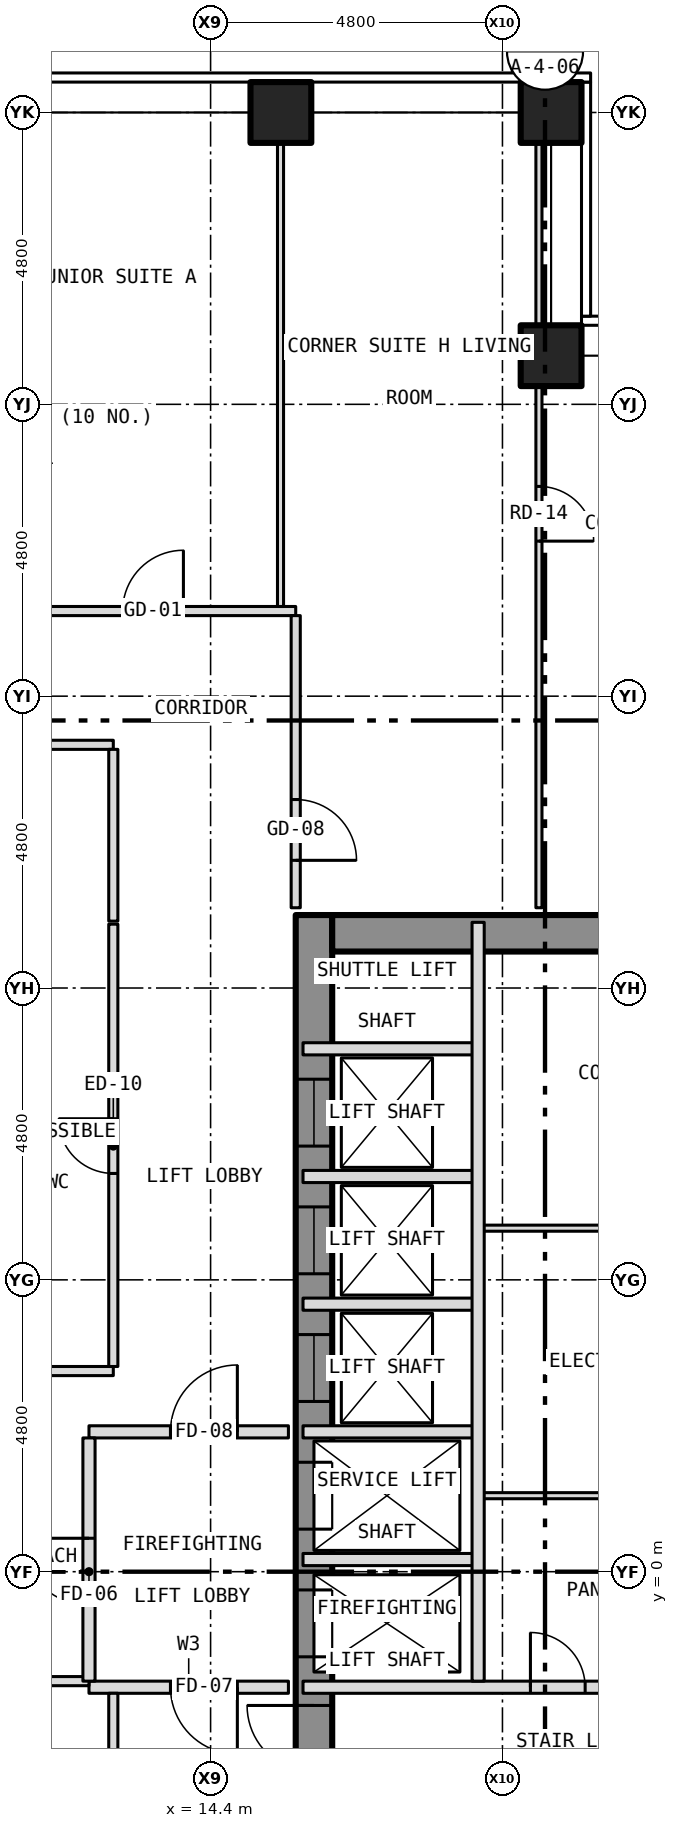
"""IFC4 building model, lengths in metres.
Left out: names, types, materials, properties, quantities, classifications, styles, units other than length and angle.
Written with IfcOpenShell. Run it as: python <this file> out.ifc"""

import sys

from ifc_helpers import new_model, si_unit, direction, frame, frame_2d, origin, origin_2d, place, context, subcontext, project, spatial, rectangle, hollow_rectangle, extrude, element, fill, save


model = new_model("IFC4")
c1 = context("Model", 3, precision=1e-05, world=origin(), true_north=direction((0.0, 1.0)))
c2 = subcontext(c1, "Body", "Model", "MODEL_VIEW")
j1 = project(units=[si_unit("LENGTHUNIT", "METRE"), si_unit("PLANEANGLEUNIT", "RADIAN")], contexts=[c1])
p1 = place(None, origin())
s1 = spatial("IfcSite", under=j1, at=p1, CompositionType="ELEMENT")
p2 = place(p1, origin())
s2 = spatial("IfcBuilding", under=s1, at=p2, CompositionType="ELEMENT")
p3 = place(p2, frame((0.0, 0.0, 67.0)))
s3 = spatial("IfcBuildingStorey", under=s2, at=p3, CompositionType="ELEMENT", Elevation=67.0)
for number, where, z_axis, x_axis in (
    (1, (15.556, 24.0, -0.15), (0.0, 0.0, 1.0), (1.0, 0.0, 0.0)),
    (2, (20.0, 24.0, -0.15), (0.0, 0.0, 1.0), (1.0, 0.0, 0.0)),
    (3, (20.0, 20.0, -0.15), (0.0, 0.0, 1.0), (1.0, 0.0, 0.0)),
):
    element("IfcColumn", number, at=place(p3, frame(where, z_axis=z_axis, x_axis=x_axis)), inside=s3, PredefinedType="COLUMN", context=c2, shape_type="SweptSolid", body=[
        extrude(hollow_rectangle(XDim=1.0, YDim=1.0, WallThickness=0.06, at=origin_2d()), origin(), (0.0, 0.0, 1.0), 3.5),
    ])
p4 = place(p3, frame((16.1, -10.8, 0.0), z_axis=(0.0, 0.0, 1.0), x_axis=(0.0, 1.0, 0.0)))
e4 = element("IfcWall", 4, at=p4, inside=s3, PredefinedType="SHEAR", context=c2, shape_type="SweptSolid", body=[
    extrude(rectangle(XDim=21.6, YDim=0.6, at=frame_2d((10.8, 0.0))), origin(), (0.0, 0.0, 1.0), 3.25),
])
p5 = place(p4, frame((9.4, 0.0, 0.0)))
e5 = element("IfcOpeningElement", 5, at=p5, cuts=e4, PredefinedType="OPENING", context=c2, shape_type="SweptSolid", body=[
    extrude(rectangle(XDim=1.1, YDim=2.1, at=frame_2d((0.55, 1.05))), frame((0.0, 0.312, 0.0), z_axis=(0.0, -1.0, 0.0), x_axis=(1.0, 0.0, 0.0)), (0.0, 0.0, 1.0), 0.624),
])
p6 = place(p4, frame((11.5, 0.0, 0.0)))
e6 = element("IfcOpeningElement", 6, at=p6, cuts=e4, PredefinedType="OPENING", context=c2, shape_type="SweptSolid", body=[
    extrude(rectangle(XDim=1.1, YDim=2.1, at=frame_2d((0.55, 1.05))), frame((0.0, 0.312, 0.0), z_axis=(0.0, -1.0, 0.0), x_axis=(1.0, 0.0, 0.0)), (0.0, 0.0, 1.0), 0.624),
])
p7 = place(p4, frame((13.6, 0.0, 0.0)))
e7 = element("IfcOpeningElement", 7, at=p7, cuts=e4, PredefinedType="OPENING", context=c2, shape_type="SweptSolid", body=[
    extrude(rectangle(XDim=1.1, YDim=2.1, at=frame_2d((0.55, 1.05))), frame((0.0, 0.312, 0.0), z_axis=(0.0, -1.0, 0.0), x_axis=(1.0, 0.0, 0.0)), (0.0, 0.0, 1.0), 0.624),
])
p8 = place(p4, frame((15.7, 0.0, 0.0)))
e8 = element("IfcOpeningElement", 8, at=p8, cuts=e4, PredefinedType="OPENING", context=c2, shape_type="SweptSolid", body=[
    extrude(rectangle(XDim=1.1, YDim=2.1, at=frame_2d((0.55, 1.05))), frame((0.0, 0.312, 0.0), z_axis=(0.0, -1.0, 0.0), x_axis=(1.0, 0.0, 0.0)), (0.0, 0.0, 1.0), 0.624),
])
p9 = place(p4, frame((17.8, 0.0, 0.0)))
e9 = element("IfcOpeningElement", 9, at=p9, cuts=e4, PredefinedType="OPENING", context=c2, shape_type="SweptSolid", body=[
    extrude(rectangle(XDim=1.1, YDim=2.1, at=frame_2d((0.55, 1.05))), frame((0.0, 0.312, 0.0), z_axis=(0.0, -1.0, 0.0), x_axis=(1.0, 0.0, 0.0)), (0.0, 0.0, 1.0), 0.624),
])
p10 = place(p4, frame((5.642, 0.0, 0.0)))
e10 = element("IfcOpeningElement", 10, at=p10, cuts=e4, PredefinedType="OPENING", context=c2, shape_type="SweptSolid", body=[
    extrude(rectangle(XDim=1.1, YDim=2.1, at=frame_2d((0.55, 1.05))), frame((0.0, 0.312, 0.0), z_axis=(0.0, -1.0, 0.0), x_axis=(1.0, 0.0, 0.0)), (0.0, 0.0, 1.0), 0.624),
])
p11 = place(p4, frame((7.5, 0.0, 0.0)))
e11 = element("IfcOpeningElement", 11, at=p11, cuts=e4, PredefinedType="OPENING", context=c2, shape_type="SweptSolid", body=[
    extrude(rectangle(XDim=1.1, YDim=2.1, at=frame_2d((0.55, 1.05))), frame((0.0, 0.312, 0.0), z_axis=(0.0, -1.0, 0.0), x_axis=(1.0, 0.0, 0.0)), (0.0, 0.0, 1.0), 0.624),
])
p12 = place(p3, frame((16.4, 10.5, 0.0), z_axis=(0.0, 0.0, 1.0), x_axis=(1.0, 0.0, 0.0)))
e12 = element("IfcWall", 12, at=p12, inside=s3, PredefinedType="SHEAR", context=c2, shape_type="SweptSolid", body=[
    extrude(rectangle(XDim=7.0, YDim=0.6, at=frame_2d((3.5, 0.0))), origin(), (0.0, 0.0, 1.0), 3.25),
])
p13 = place(p3, frame((12.4, -1.9, 0.0), z_axis=(0.0, 0.0, 1.0), x_axis=(1.0, 0.0, 0.0)))
e13 = element("IfcWall", 13, at=p13, inside=s3, PredefinedType="PARTITIONING", context=c2, shape_type="SweptSolid", body=[
    extrude(rectangle(XDim=3.28, YDim=0.2, at=frame_2d((1.64, 0.0))), origin(), (0.0, 0.0, 1.0), 3.35),
])
p14 = place(p13, frame((1.34, 0.0, 0.0)))
e14 = element("IfcOpeningElement", 14, at=p14, cuts=e13, PredefinedType="OPENING", context=c2, shape_type="SweptSolid", body=[
    extrude(rectangle(XDim=1.1, YDim=2.1, at=frame_2d((0.55, 1.05))), frame((0.0, 0.112, 0.0), z_axis=(0.0, -1.0, 0.0), x_axis=(1.0, 0.0, 0.0)), (0.0, 0.0, 1.0), 0.224),
])
p15 = place(p3, frame((15.92, -1.9, 0.0), z_axis=(0.0, 0.0, 1.0), x_axis=(1.0, 0.0, 0.0)))
e15 = element("IfcWall", 15, at=p15, inside=s3, PredefinedType="PARTITIONING", context=c2, shape_type="SweptSolid", body=[
    extrude(rectangle(XDim=7.96, YDim=0.2, at=frame_2d((3.98, 0.0))), origin(), (0.0, 0.0, 1.0), 3.25),
])
p16 = place(p15, frame((3.74, 0.0, 0.0)))
e16 = element("IfcOpeningElement", 16, at=p16, cuts=e15, PredefinedType="OPENING", context=c2, shape_type="SweptSolid", body=[
    extrude(rectangle(XDim=0.9, YDim=2.1, at=frame_2d((0.45, 1.05))), frame((0.0, 0.112, 0.0), z_axis=(0.0, -1.0, 0.0), x_axis=(1.0, 0.0, 0.0)), (0.0, 0.0, 1.0), 0.224),
])
p17 = place(p3, frame((9.12, -1.8, 0.0), z_axis=(0.0, 0.0, 1.0), x_axis=(1.0, 0.0, 0.0)))
e17 = element("IfcWall", 17, at=p17, inside=s3, PredefinedType="PARTITIONING", context=c2, shape_type="SweptSolid", body=[
    extrude(rectangle(XDim=3.28, YDim=0.15, at=frame_2d((1.64, 0.0))), origin(), (0.0, 0.0, 1.0), 3.35),
])
p18 = place(p3, frame((15.92, 0.2, 0.0), z_axis=(0.0, 0.0, 1.0), x_axis=(1.0, 0.0, 0.0)))
e18 = element("IfcWall", 18, at=p18, inside=s3, PredefinedType="PARTITIONING", context=c2, shape_type="SweptSolid", body=[
    extrude(rectangle(XDim=2.88, YDim=0.2, at=frame_2d((1.44, 0.0))), origin(), (0.0, 0.0, 1.0), 3.25),
])
p19 = place(p3, frame((18.8, 1.25, 0.0), z_axis=(0.0, 0.0, 1.0), x_axis=(1.0, 0.0, 0.0)))
e19 = element("IfcWall", 19, at=p19, inside=s3, PredefinedType="PARTITIONING", context=c2, shape_type="SweptSolid", body=[
    extrude(rectangle(XDim=5.08, YDim=0.1, at=frame_2d((2.54, 0.0))), origin(), (0.0, 0.0, 1.0), 3.25),
])
p20 = place(p19, frame((2.15, 0.0, 0.0)))
e20 = element("IfcOpeningElement", 20, at=p20, cuts=e19, PredefinedType="OPENING", context=c2, shape_type="SweptSolid", body=[
    extrude(rectangle(XDim=0.9, YDim=2.1, at=frame_2d((0.45, 1.05))), frame((0.0, 0.062, 0.0), z_axis=(0.0, -1.0, 0.0), x_axis=(1.0, 0.0, 0.0)), (0.0, 0.0, 1.0), 0.124),
])
p21 = place(p3, frame((12.4, 2.3, 0.0), z_axis=(0.0, 0.0, 1.0), x_axis=(1.0, 0.0, 0.0)))
e21 = element("IfcWall", 21, at=p21, inside=s3, PredefinedType="PARTITIONING", context=c2, shape_type="SweptSolid", body=[
    extrude(rectangle(XDim=3.28, YDim=0.2, at=frame_2d((1.64, 0.0))), origin(), (0.0, 0.0, 1.0), 3.35),
])
p22 = place(p21, frame((1.34, 0.0, 0.0)))
e22 = element("IfcOpeningElement", 22, at=p22, cuts=e21, PredefinedType="OPENING", context=c2, shape_type="SweptSolid", body=[
    extrude(rectangle(XDim=1.1, YDim=2.1, at=frame_2d((0.55, 1.05))), frame((0.0, 0.112, 0.0), z_axis=(0.0, -1.0, 0.0), x_axis=(1.0, 0.0, 0.0)), (0.0, 0.0, 1.0), 0.224),
])
p23 = place(p3, frame((15.92, 2.3, 0.0), z_axis=(0.0, 0.0, 1.0), x_axis=(1.0, 0.0, 0.0)))
e23 = element("IfcWall", 23, at=p23, inside=s3, PredefinedType="PARTITIONING", context=c2, shape_type="SweptSolid", body=[
    extrude(rectangle(XDim=2.88, YDim=0.2, at=frame_2d((1.44, 0.0))), origin(), (0.0, 0.0, 1.0), 3.25),
])
p24 = place(p3, frame((9.15, 3.3, 0.0), z_axis=(0.0, 0.0, 1.0), x_axis=(1.0, 0.0, 0.0)))
e24 = element("IfcWall", 24, at=p24, inside=s3, PredefinedType="PARTITIONING", context=c2, shape_type="SweptSolid", body=[
    extrude(rectangle(XDim=3.65, YDim=0.15, at=frame_2d((1.825, 0.0))), origin(), (0.0, 0.0, 1.0), 3.35),
])
p25 = place(p24, frame((0.462, 0.0, 0.0)))
e25 = element("IfcOpeningElement", 25, at=p25, cuts=e24, PredefinedType="OPENING", context=c2, shape_type="SweptSolid", body=[
    extrude(rectangle(XDim=0.9, YDim=2.1, at=frame_2d((0.45, 1.05))), frame((0.0, 0.087, 0.0), z_axis=(0.0, -1.0, 0.0), x_axis=(1.0, 0.0, 0.0)), (0.0, 0.0, 1.0), 0.174),
])
p26 = place(p3, frame((15.92, 4.4, 0.0), z_axis=(0.0, 0.0, 1.0), x_axis=(1.0, 0.0, 0.0)))
e26 = element("IfcWall", 26, at=p26, inside=s3, PredefinedType="PARTITIONING", context=c2, shape_type="SweptSolid", body=[
    extrude(rectangle(XDim=2.88, YDim=0.2, at=frame_2d((1.44, 0.0))), origin(), (0.0, 0.0, 1.0), 3.25),
])
p27 = place(p3, frame((18.8, 5.65, 0.0), z_axis=(0.0, 0.0, 1.0), x_axis=(1.0, 0.0, 0.0)))
e27 = element("IfcWall", 27, at=p27, inside=s3, PredefinedType="PARTITIONING", context=c2, shape_type="SweptSolid", body=[
    extrude(rectangle(XDim=5.08, YDim=0.1, at=frame_2d((2.54, 0.0))), origin(), (0.0, 0.0, 1.0), 3.25),
])
p28 = place(p27, frame((2.15, 0.0, 0.0)))
e28 = element("IfcOpeningElement", 28, at=p28, cuts=e27, PredefinedType="OPENING", context=c2, shape_type="SweptSolid", body=[
    extrude(rectangle(XDim=0.9, YDim=2.1, at=frame_2d((0.45, 1.05))), frame((0.0, 0.062, 0.0), z_axis=(0.0, -1.0, 0.0), x_axis=(1.0, 0.0, 0.0)), (0.0, 0.0, 1.0), 0.124),
])
for number, where, z_axis, x_axis in (
    (29, (15.92, 6.5, 0.0), (0.0, 0.0, 1.0), (1.0, 0.0, 0.0)),
    (30, (15.92, 8.6, 0.0), (0.0, 0.0, 1.0), (1.0, 0.0, 0.0)),
):
    element("IfcWall", number, at=place(p3, frame(where, z_axis=z_axis, x_axis=x_axis)), inside=s3, PredefinedType="PARTITIONING", context=c2, shape_type="SweptSolid", body=[
        extrude(rectangle(XDim=2.88, YDim=0.2, at=frame_2d((1.44, 0.0))), origin(), (0.0, 0.0, 1.0), 3.25),
    ])
p29 = place(p3, frame((9.15, 13.6, 0.0), z_axis=(0.0, 0.0, 1.0), x_axis=(1.0, 0.0, 0.0)))
e31 = element("IfcWall", 31, at=p29, inside=s3, PredefinedType="PARTITIONING", context=c2, shape_type="SweptSolid", body=[
    extrude(rectangle(XDim=3.65, YDim=0.15, at=frame_2d((1.825, 0.0))), origin(), (0.0, 0.0, 1.0), 3.35),
])
p30 = place(p3, frame((9.15, 15.8, 0.0), z_axis=(0.0, 0.0, 1.0), x_axis=(1.0, 0.0, 0.0)))
e32 = element("IfcWall", 32, at=p30, inside=s3, PredefinedType="PARTITIONING", context=c2, shape_type="SweptSolid", body=[
    extrude(rectangle(XDim=6.65, YDim=0.15, at=frame_2d((3.325, 0.0))), origin(), (0.0, 0.0, 1.0), 3.35),
])
p31 = place(p30, frame((3.803, 0.0, 0.0)))
e33 = element("IfcOpeningElement", 33, at=p31, cuts=e32, PredefinedType="OPENING", context=c2, shape_type="SweptSolid", body=[
    extrude(rectangle(XDim=1.0, YDim=2.1, at=frame_2d((0.5, 1.05))), frame((0.0, 0.087, 0.0), z_axis=(0.0, -1.0, 0.0), x_axis=(1.0, 0.0, 0.0)), (0.0, 0.0, 1.0), 0.174),
])
p32 = place(p3, frame((12.4, -1.8, 0.0), z_axis=(0.0, 0.0, 1.0), x_axis=(0.0, 1.0, 0.0)))
e34 = element("IfcWall", 34, at=p32, inside=s3, PredefinedType="PARTITIONING", context=c2, shape_type="SweptSolid", body=[
    extrude(rectangle(XDim=4.0, YDim=0.2, at=frame_2d((2.0, 0.0))), origin(), (0.0, 0.0, 1.0), 3.35),
])
p33 = place(p32, frame((1.25, 0.0, 0.0)))
e35 = element("IfcOpeningElement", 35, at=p33, cuts=e34, PredefinedType="OPENING", context=c2, shape_type="SweptSolid", body=[
    extrude(rectangle(XDim=1.1, YDim=2.1, at=frame_2d((0.55, 1.05))), frame((0.0, 0.112, 0.0), z_axis=(0.0, -1.0, 0.0), x_axis=(1.0, 0.0, 0.0)), (0.0, 0.0, 1.0), 0.224),
])
p34 = place(p3, frame((12.8, -13.525, 0.0), z_axis=(0.0, 0.0, 1.0), x_axis=(0.0, 1.0, 0.0)))
e36 = element("IfcWall", 36, at=p34, inside=s3, PredefinedType="PARTITIONING", context=c2, shape_type="SweptSolid", body=[
    extrude(rectangle(XDim=11.525, YDim=0.15, at=frame_2d((5.762, 0.0))), origin(), (0.0, 0.0, 1.0), 3.35),
])
p35 = place(p34, frame((6.725, 0.0, 0.0)))
e37 = element("IfcOpeningElement", 37, at=p35, cuts=e36, PredefinedType="OPENING", context=c2, shape_type="SweptSolid", body=[
    extrude(rectangle(XDim=0.9, YDim=2.1, at=frame_2d((0.45, 1.05))), frame((0.0, 0.087, 0.0), z_axis=(0.0, -1.0, 0.0), x_axis=(1.0, 0.0, 0.0)), (0.0, 0.0, 1.0), 0.174),
])
p36 = place(p3, frame((12.8, 3.375, 0.0), z_axis=(0.0, 0.0, 1.0), x_axis=(0.0, 1.0, 0.0)))
e38 = element("IfcWall", 38, at=p36, inside=s3, PredefinedType="PARTITIONING", context=c2, shape_type="SweptSolid", body=[
    extrude(rectangle(XDim=7.275, YDim=0.15, at=frame_2d((3.637, 0.0))), origin(), (0.0, 0.0, 1.0), 3.35),
])
p37 = place(p36, frame((3.175, 0.0, 0.0)))
e39 = element("IfcOpeningElement", 39, at=p37, cuts=e38, PredefinedType="OPENING", context=c2, shape_type="SweptSolid", body=[
    extrude(rectangle(XDim=0.9, YDim=2.1, at=frame_2d((0.45, 1.05))), frame((0.0, 0.087, 0.0), z_axis=(0.0, -1.0, 0.0), x_axis=(1.0, 0.0, 0.0)), (0.0, 0.0, 1.0), 0.174),
])
p38 = place(p3, frame((12.8, 10.7, 0.0), z_axis=(0.0, 0.0, 1.0), x_axis=(0.0, 1.0, 0.0)))
e40 = element("IfcWall", 40, at=p38, inside=s3, PredefinedType="PARTITIONING", context=c2, shape_type="SweptSolid", body=[
    extrude(rectangle(XDim=2.825, YDim=0.15, at=frame_2d((1.413, 0.0))), origin(), (0.0, 0.0, 1.0), 3.35),
])
p39 = place(p3, frame((15.55, 15.875, 0.0), z_axis=(0.0, 0.0, 1.0), x_axis=(0.0, 1.0, 0.0)))
e41 = element("IfcWall", 41, at=p39, inside=s3, PredefinedType="PARTITIONING", context=c2, shape_type="SweptSolid", body=[
    extrude(rectangle(XDim=8.005, YDim=0.1, at=frame_2d((4.002, 0.0))), origin(), (0.0, 0.0, 1.0), 3.35),
])
p40 = place(p3, frame((15.8, 10.92, 0.0), z_axis=(0.0, 0.0, 1.0), x_axis=(0.0, 1.0, 0.0)))
e42 = element("IfcWall", 42, at=p40, inside=s3, PredefinedType="PARTITIONING", context=c2, shape_type="SweptSolid", body=[
    extrude(rectangle(XDim=4.805, YDim=0.15, at=frame_2d((2.403, 0.0))), origin(), (0.0, 0.0, 1.0), 3.35),
])
p41 = place(p40, frame((0.78, 0.0, 0.0)))
e43 = element("IfcOpeningElement", 43, at=p41, cuts=e42, PredefinedType="OPENING", context=c2, shape_type="SweptSolid", body=[
    extrude(rectangle(XDim=1.0, YDim=2.1, at=frame_2d((0.5, 1.05))), frame((0.0, 0.087, 0.0), z_axis=(0.0, -1.0, 0.0), x_axis=(1.0, 0.0, 0.0)), (0.0, 0.0, 1.0), 0.174),
])
p42 = place(p3, frame((18.8, -1.8, 0.0), z_axis=(0.0, 0.0, 1.0), x_axis=(0.0, 1.0, 0.0)))
e44 = element("IfcWall", 44, at=p42, inside=s3, PredefinedType="PARTITIONING", context=c2, shape_type="SweptSolid", body=[
    extrude(rectangle(XDim=12.48, YDim=0.2, at=frame_2d((6.24, 0.0))), origin(), (0.0, 0.0, 1.0), 3.25),
])
p43 = place(p3, frame((19.8, 10.92, 0.0), z_axis=(0.0, 0.0, 1.0), x_axis=(0.0, 1.0, 0.0)))
e45 = element("IfcWall", 45, at=p43, inside=s3, PredefinedType="PARTITIONING", context=c2, shape_type="SweptSolid", body=[
    extrude(rectangle(XDim=12.96, YDim=0.1, at=frame_2d((6.48, 0.0))), origin(), (0.0, 0.0, 1.0), 3.35),
])
p44 = place(p43, frame((6.03, 0.0, 0.0)))
e46 = element("IfcOpeningElement", 46, at=p44, cuts=e45, PredefinedType="OPENING", context=c2, shape_type="SweptSolid", body=[
    extrude(rectangle(XDim=0.9, YDim=2.1, at=frame_2d((0.45, 1.05))), frame((0.0, 0.062, 0.0), z_axis=(0.0, -1.0, 0.0), x_axis=(1.0, 0.0, 0.0)), (0.0, 0.0, 1.0), 0.124),
])
p45 = place(p5, origin())
e47 = element("IfcDoor", 47, at=p45, inside=s3, OperationType="SLIDING_TO_LEFT", PredefinedType="DOOR", context=c2, shape_type="SweptSolid", body=[
    extrude(rectangle(XDim=1.1, YDim=2.1, at=frame_2d((0.55, 1.05))), frame((0.0, 0.025, 0.0), z_axis=(0.0, -1.0, 0.0), x_axis=(1.0, 0.0, 0.0)), (0.0, 0.0, 1.0), 0.05),
])
fill(e5, e47)
p46 = place(p6, origin())
e48 = element("IfcDoor", 48, at=p46, inside=s3, OperationType="SLIDING_TO_LEFT", PredefinedType="DOOR", context=c2, shape_type="SweptSolid", body=[
    extrude(rectangle(XDim=1.1, YDim=2.1, at=frame_2d((0.55, 1.05))), frame((0.0, 0.025, 0.0), z_axis=(0.0, -1.0, 0.0), x_axis=(1.0, 0.0, 0.0)), (0.0, 0.0, 1.0), 0.05),
])
fill(e6, e48)
p47 = place(p7, origin())
e49 = element("IfcDoor", 49, at=p47, inside=s3, OperationType="SLIDING_TO_LEFT", PredefinedType="DOOR", context=c2, shape_type="SweptSolid", body=[
    extrude(rectangle(XDim=1.1, YDim=2.1, at=frame_2d((0.55, 1.05))), frame((0.0, 0.025, 0.0), z_axis=(0.0, -1.0, 0.0), x_axis=(1.0, 0.0, 0.0)), (0.0, 0.0, 1.0), 0.05),
])
fill(e7, e49)
p48 = place(p8, origin())
e50 = element("IfcDoor", 50, at=p48, inside=s3, OperationType="SLIDING_TO_LEFT", PredefinedType="DOOR", context=c2, shape_type="SweptSolid", body=[
    extrude(rectangle(XDim=1.1, YDim=2.1, at=frame_2d((0.55, 1.05))), frame((0.0, 0.025, 0.0), z_axis=(0.0, -1.0, 0.0), x_axis=(1.0, 0.0, 0.0)), (0.0, 0.0, 1.0), 0.05),
])
fill(e8, e50)
p49 = place(p9, origin())
e51 = element("IfcDoor", 51, at=p49, inside=s3, OperationType="SLIDING_TO_LEFT", PredefinedType="DOOR", context=c2, shape_type="SweptSolid", body=[
    extrude(rectangle(XDim=1.1, YDim=2.1, at=frame_2d((0.55, 1.05))), frame((0.0, 0.025, 0.0), z_axis=(0.0, -1.0, 0.0), x_axis=(1.0, 0.0, 0.0)), (0.0, 0.0, 1.0), 0.05),
])
fill(e9, e51)
p50 = place(p11, origin())
e52 = element("IfcDoor", 52, at=p50, inside=s3, OperationType="SINGLE_SWING_RIGHT", PredefinedType="DOOR", context=c2, shape_type="SweptSolid", body=[
    extrude(rectangle(XDim=1.1, YDim=2.1, at=frame_2d((0.55, 1.05))), frame((0.0, 0.025, 0.0), z_axis=(0.0, -1.0, 0.0), x_axis=(1.0, 0.0, 0.0)), (0.0, 0.0, 1.0), 0.05),
])
fill(e11, e52)
p51 = place(p16, origin())
e53 = element("IfcDoor", 53, at=p51, inside=s3, OperationType="SINGLE_SWING_LEFT", PredefinedType="DOOR", context=c2, shape_type="SweptSolid", body=[
    extrude(rectangle(XDim=0.9, YDim=2.1, at=frame_2d((0.45, 1.05))), frame((0.0, 0.025, 0.0), z_axis=(0.0, -1.0, 0.0), x_axis=(1.0, 0.0, 0.0)), (0.0, 0.0, 1.0), 0.05),
])
fill(e16, e53)
p52 = place(p33, origin())
e54 = element("IfcDoor", 54, at=p52, inside=s3, OperationType="SINGLE_SWING_RIGHT", PredefinedType="DOOR", context=c2, shape_type="SweptSolid", body=[
    extrude(rectangle(XDim=1.1, YDim=2.1, at=frame_2d((0.55, 1.05))), frame((0.0, 0.025, 0.0), z_axis=(0.0, -1.0, 0.0), x_axis=(1.0, 0.0, 0.0)), (0.0, 0.0, 1.0), 0.05),
])
fill(e35, e54)
p53 = place(p14, origin())
e55 = element("IfcDoor", 55, at=p53, inside=s3, OperationType="SINGLE_SWING_RIGHT", PredefinedType="DOOR", context=c2, shape_type="SweptSolid", body=[
    extrude(rectangle(XDim=1.1, YDim=2.1, at=frame_2d((0.55, 1.05))), frame((0.0, 0.025, 0.0), z_axis=(0.0, -1.0, 0.0), x_axis=(1.0, 0.0, 0.0)), (0.0, 0.0, 1.0), 0.05),
])
fill(e14, e55)
p54 = place(p22, origin())
e56 = element("IfcDoor", 56, at=p54, inside=s3, OperationType="SINGLE_SWING_RIGHT", PredefinedType="DOOR", context=c2, shape_type="SweptSolid", body=[
    extrude(rectangle(XDim=1.1, YDim=2.1, at=frame_2d((0.55, 1.05))), frame((0.0, 0.025, 0.0), z_axis=(0.0, -1.0, 0.0), x_axis=(1.0, 0.0, 0.0)), (0.0, 0.0, 1.0), 0.05),
])
fill(e22, e56)
p55 = place(p31, origin())
e57 = element("IfcDoor", 57, at=p55, inside=s3, OperationType="SINGLE_SWING_RIGHT", PredefinedType="DOOR", context=c2, shape_type="SweptSolid", body=[
    extrude(rectangle(XDim=1.0, YDim=2.1, at=frame_2d((0.5, 1.05))), frame((0.0, 0.025, 0.0), z_axis=(0.0, -1.0, 0.0), x_axis=(1.0, 0.0, 0.0)), (0.0, 0.0, 1.0), 0.05),
])
fill(e33, e57)
p56 = place(p41, origin())
e58 = element("IfcDoor", 58, at=p56, inside=s3, OperationType="SINGLE_SWING_LEFT", PredefinedType="DOOR", context=c2, shape_type="SweptSolid", body=[
    extrude(rectangle(XDim=1.0, YDim=2.1, at=frame_2d((0.5, 1.05))), frame((0.0, 0.025, 0.0), z_axis=(0.0, -1.0, 0.0), x_axis=(1.0, 0.0, 0.0)), (0.0, 0.0, 1.0), 0.05),
])
fill(e43, e58)
p57 = place(p44, origin())
e59 = element("IfcDoor", 59, at=p57, inside=s3, OperationType="SINGLE_SWING_LEFT", PredefinedType="DOOR", context=c2, shape_type="SweptSolid", body=[
    extrude(rectangle(XDim=0.9, YDim=2.1, at=frame_2d((0.45, 1.05))), frame((0.0, 0.025, 0.0), z_axis=(0.0, -1.0, 0.0), x_axis=(1.0, 0.0, 0.0)), (0.0, 0.0, 1.0), 0.05),
])
fill(e46, e59)
p58 = place(p37, origin())
e60 = element("IfcDoor", 60, at=p58, inside=s3, OperationType="SINGLE_SWING_RIGHT", PredefinedType="DOOR", context=c2, shape_type="SweptSolid", body=[
    extrude(rectangle(XDim=0.9, YDim=2.1, at=frame_2d((0.45, 1.05))), frame((0.0, 0.025, 0.0), z_axis=(0.0, -1.0, 0.0), x_axis=(1.0, 0.0, 0.0)), (0.0, 0.0, 1.0), 0.05),
])
fill(e39, e60)
save(model, sys.argv[1])
